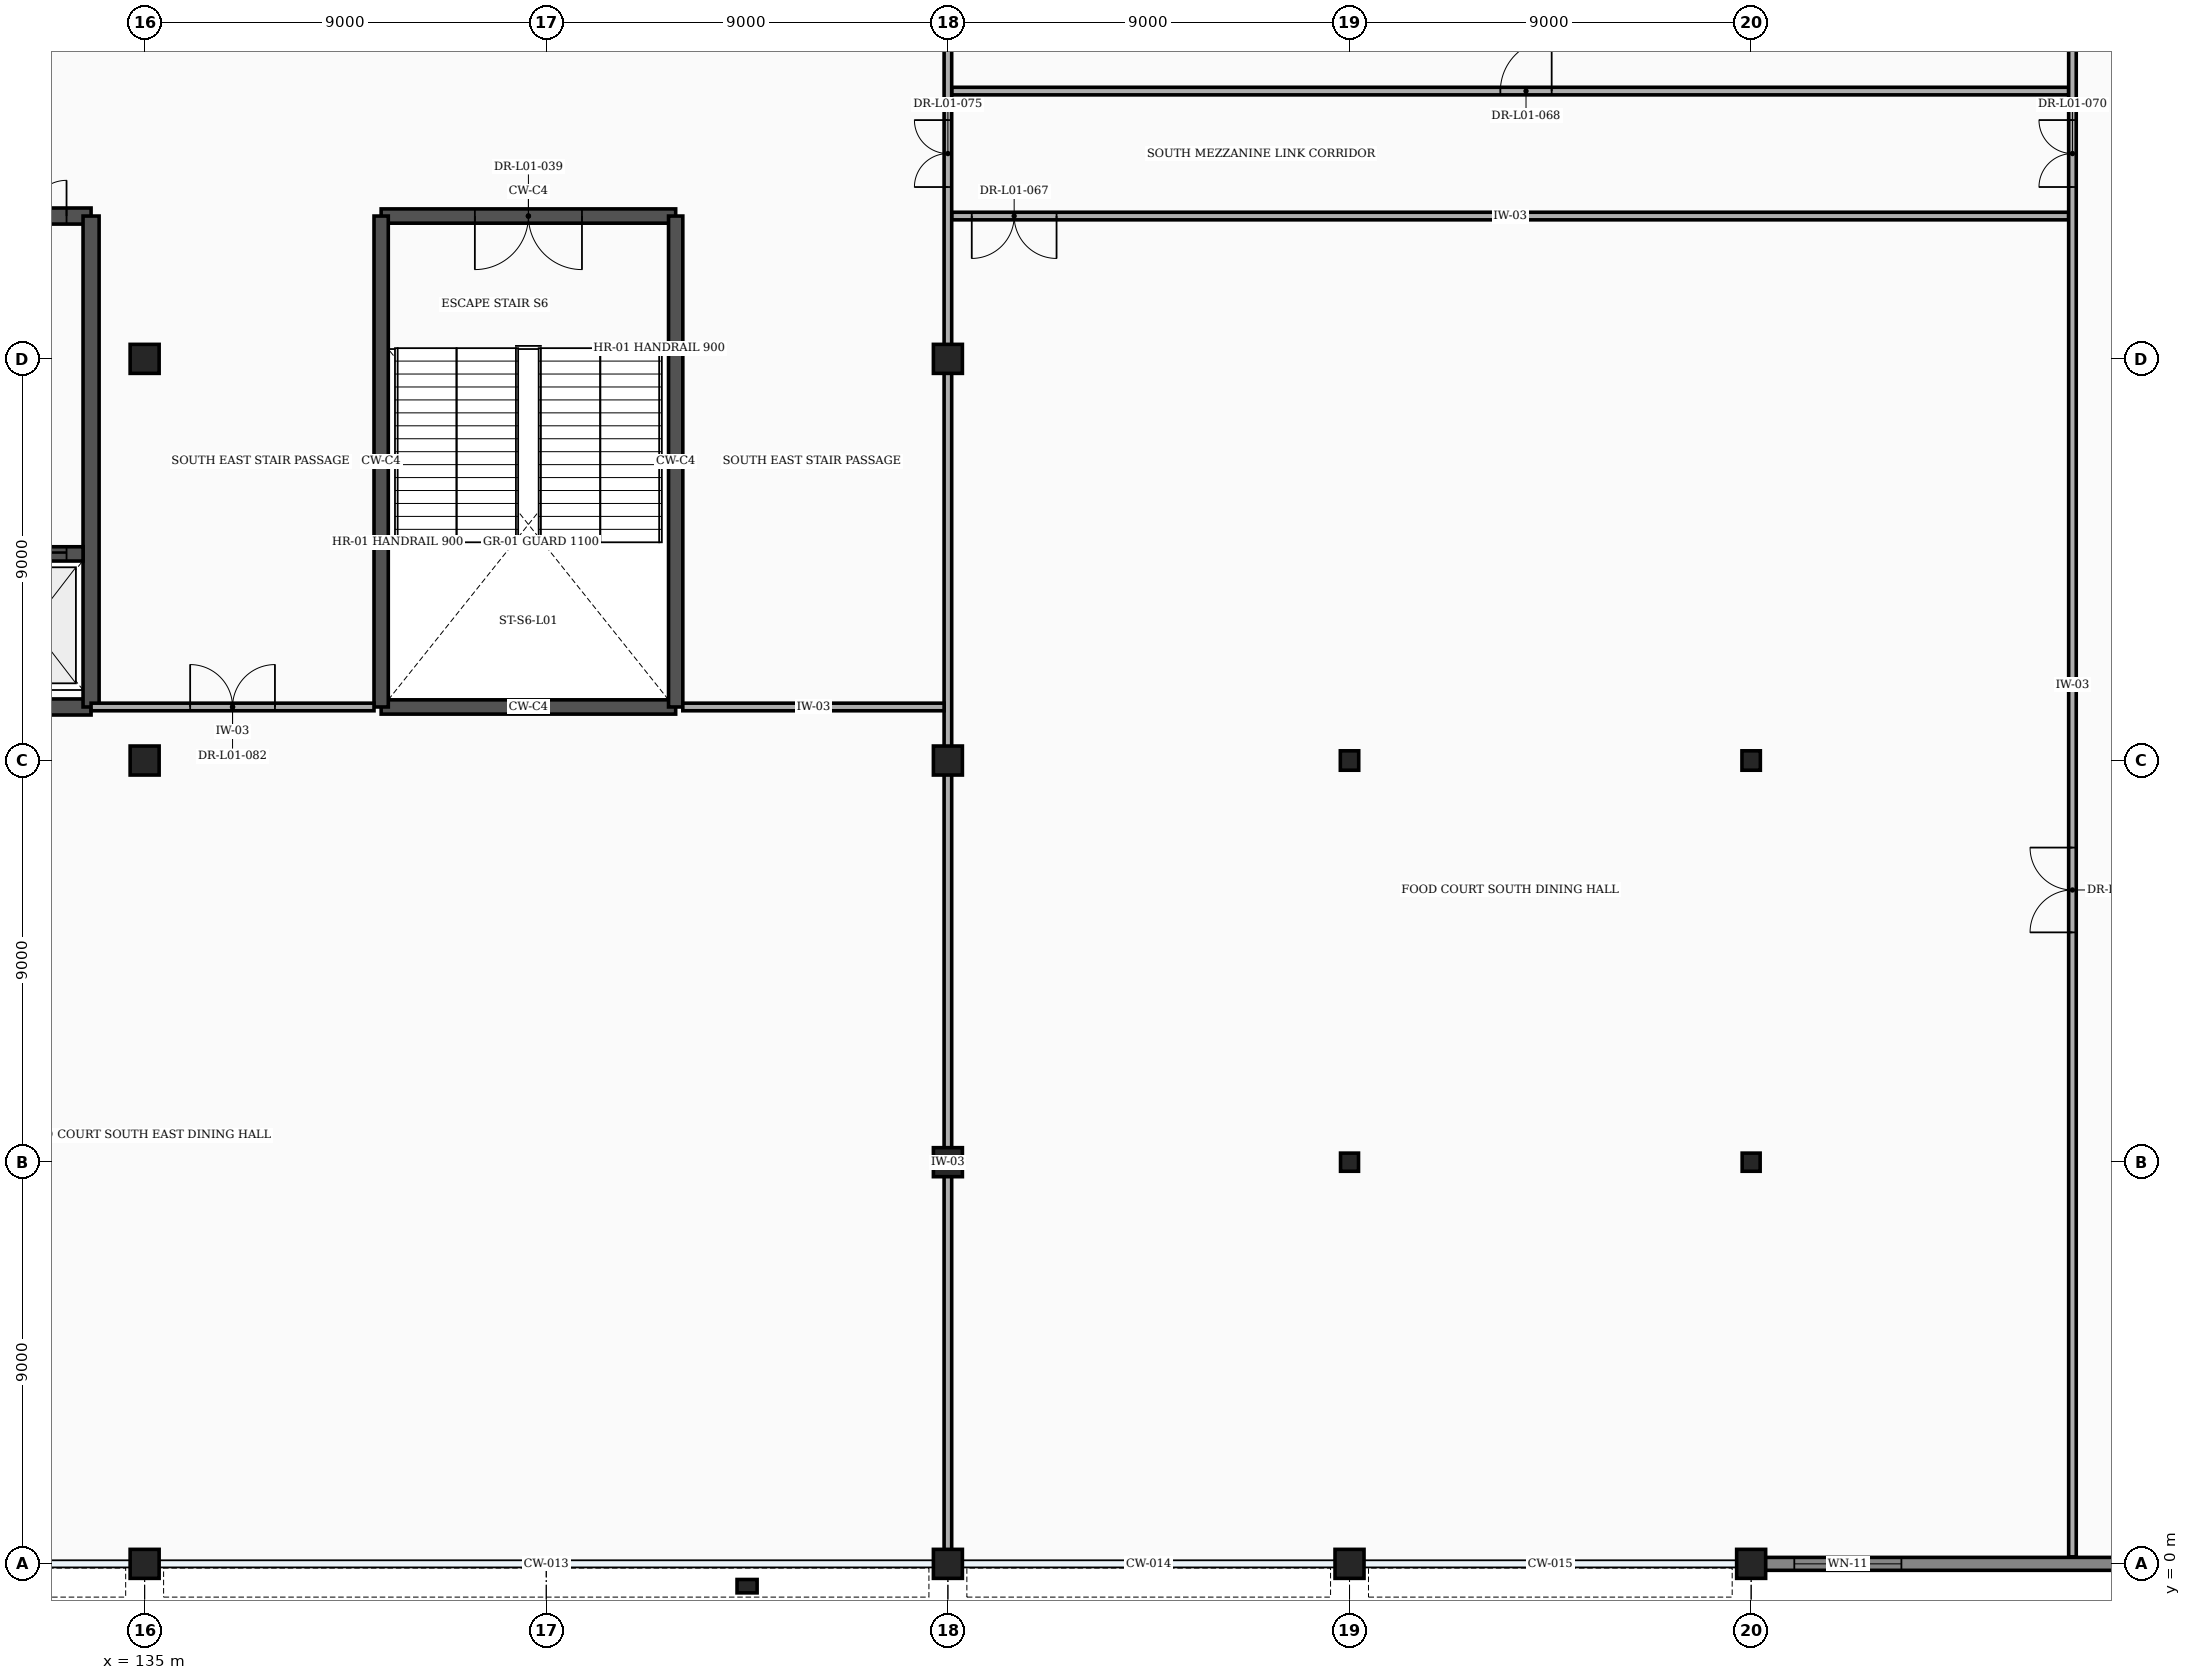
"""IFC4 building model, lengths in metres.
Left out: names, types, materials, properties, quantities, classifications, styles, units other than length and angle.
Written with IfcOpenShell. Run it as: python <this file> out.ifc"""

import sys

from ifc_helpers import new_model, si_unit, direction, frame, frame_2d, origin, origin_2d, place, context, subcontext, project, spatial, rectangle, i_section, extrude, element, fill, save


model = new_model("IFC4")
c1 = context("Model", 3, precision=1e-05, world=origin(), true_north=direction((0.0, 1.0)))
c2 = subcontext(c1, "Body", "Model", "MODEL_VIEW")
j1 = project(units=[si_unit("LENGTHUNIT", "METRE"), si_unit("PLANEANGLEUNIT", "RADIAN")], contexts=[c1])
p1 = place(None, origin())
s1 = spatial("IfcSite", under=j1, at=p1, CompositionType="ELEMENT")
p2 = place(p1, origin())
s2 = spatial("IfcBuilding", under=s1, at=p2, CompositionType="ELEMENT")
p3 = place(p2, frame((0.0, 0.0, 6.0)))
s3 = spatial("IfcBuildingStorey", under=s2, at=p3, CompositionType="ELEMENT", Elevation=6.0)
for number, where, z_axis, x_axis in (
    (1, (135.0, 0.0, 0.0), (0.0, 0.0, 1.0), (1.0, 0.0, 0.0)),
    (2, (135.0, 18.0, 0.0), (0.0, 0.0, 1.0), (1.0, 0.0, 0.0)),
    (3, (135.0, 27.0, 0.0), (0.0, 0.0, 1.0), (1.0, 0.0, 0.0)),
    (4, (153.0, 0.0, 0.0), (0.0, 0.0, 1.0), (1.0, 0.0, 0.0)),
    (5, (153.0, 9.0, 0.0), (0.0, 0.0, 1.0), (1.0, 0.0, 0.0)),
    (6, (153.0, 18.0, 0.0), (0.0, 0.0, 1.0), (1.0, 0.0, 0.0)),
    (7, (153.0, 27.0, 0.0), (0.0, 0.0, 1.0), (1.0, 0.0, 0.0)),
    (8, (162.0, 0.0, 0.0), (0.0, 0.0, 1.0), (1.0, 0.0, 0.0)),
):
    element("IfcColumn", number, at=place(p3, frame(where, z_axis=z_axis, x_axis=x_axis)), inside=s3, PredefinedType="COLUMN", context=c2, shape_type="SweptSolid", body=[
        extrude(rectangle(XDim=0.65, YDim=0.65, at=origin_2d()), origin(), (0.0, 0.0, 1.0), 5.4),
    ])
p4 = place(p3, frame((162.0, 9.0, 0.0), z_axis=(0.0, 0.0, 1.0), x_axis=(1.0, 0.0, 0.0)))
e9 = element("IfcColumn", 9, at=p4, inside=s3, PredefinedType="COLUMN", context=c2, shape_type="SweptSolid", body=[
    extrude(i_section(OverallWidth=0.403, OverallDepth=0.406, WebThickness=0.027, FlangeThickness=0.043, at=origin_2d()), origin(), (0.0, 0.0, 1.0), 5.4),
])
p5 = place(p3, frame((162.0, 18.0, 0.0), z_axis=(0.0, 0.0, 1.0), x_axis=(1.0, 0.0, 0.0)))
e10 = element("IfcColumn", 10, at=p5, inside=s3, PredefinedType="COLUMN", context=c2, shape_type="SweptSolid", body=[
    extrude(i_section(OverallWidth=0.412, OverallDepth=0.435, WebThickness=0.036, FlangeThickness=0.058, at=origin_2d()), origin(), (0.0, 0.0, 1.0), 5.4),
])
p6 = place(p3, frame((171.0, 0.0, 0.0), z_axis=(0.0, 0.0, 1.0), x_axis=(1.0, 0.0, 0.0)))
e11 = element("IfcColumn", 11, at=p6, inside=s3, PredefinedType="COLUMN", context=c2, shape_type="SweptSolid", body=[
    extrude(rectangle(XDim=0.65, YDim=0.65, at=origin_2d()), origin(), (0.0, 0.0, 1.0), 5.4),
])
p7 = place(p3, frame((171.0, 9.0, 0.0), z_axis=(0.0, 0.0, 1.0), x_axis=(1.0, 0.0, 0.0)))
e12 = element("IfcColumn", 12, at=p7, inside=s3, PredefinedType="COLUMN", context=c2, shape_type="SweptSolid", body=[
    extrude(i_section(OverallWidth=0.403, OverallDepth=0.406, WebThickness=0.027, FlangeThickness=0.043, at=origin_2d()), origin(), (0.0, 0.0, 1.0), 5.4),
])
p8 = place(p3, frame((171.0, 18.0, 0.0), z_axis=(0.0, 0.0, 1.0), x_axis=(1.0, 0.0, 0.0)))
e13 = element("IfcColumn", 13, at=p8, inside=s3, PredefinedType="COLUMN", context=c2, shape_type="SweptSolid", body=[
    extrude(i_section(OverallWidth=0.412, OverallDepth=0.435, WebThickness=0.036, FlangeThickness=0.058, at=origin_2d()), origin(), (0.0, 0.0, 1.0), 5.4),
])
p9 = place(p3, frame((148.5, -0.5, 0.0), z_axis=(0.0, 0.0, 1.0), x_axis=(1.0, 0.0, 0.0)))
e14 = element("IfcColumn", 14, at=p9, inside=s3, PredefinedType="PILASTER", context=c2, shape_type="SweptSolid", body=[
    extrude(rectangle(XDim=0.45, YDim=0.3, at=origin_2d()), origin(), (0.0, 0.0, 1.0), 5.4),
])
p10 = place(p3, frame((171.317, 0.0, 0.0), z_axis=(0.0, 0.0, 1.0), x_axis=(1.0, 0.0, 0.0)))
e15 = element("IfcWall", 15, at=p10, inside=s3, PredefinedType="STANDARD", context=c2, shape_type="SweptSolid", body=[
    extrude(rectangle(XDim=17.366, YDim=0.29, at=frame_2d((8.683, 0.0))), origin(), (0.0, 0.0, 1.0), 4.388),
])
p11 = place(p10, frame((0.65, 0.0, 0.85)))
e16 = element("IfcOpeningElement", 16, at=p11, cuts=e15, PredefinedType="OPENING", context=c2, shape_type="SweptSolid", body=[
    extrude(rectangle(XDim=2.4, YDim=2.6, at=frame_2d((1.2, 1.3))), frame((0.0, 0.157, 0.0), z_axis=(0.0, -1.0, 0.0), x_axis=(1.0, 0.0, 0.0)), (0.0, 0.0, 1.0), 0.314),
])
p12 = place(p3, frame((127.2, 19.2, 0.0), z_axis=(0.0, 0.0, 1.0), x_axis=(1.0, 0.0, 0.0)))
e17 = element("IfcWall", 17, at=p12, inside=s3, PredefinedType="SHEAR", context=c2, shape_type="SweptSolid", body=[
    extrude(rectangle(XDim=6.6, YDim=0.36, at=frame_2d((3.3, 0.0))), origin(), (0.0, 0.0, 1.0), 5.15),
])
p13 = place(p3, frame((127.2, 30.2, 0.0), z_axis=(0.0, 0.0, 1.0), x_axis=(1.0, 0.0, 0.0)))
e18 = element("IfcWall", 18, at=p13, inside=s3, PredefinedType="SHEAR", context=c2, shape_type="SweptSolid", body=[
    extrude(rectangle(XDim=6.6, YDim=0.36, at=frame_2d((3.3, 0.0))), origin(), (0.0, 0.0, 1.0), 5.15),
])
p14 = place(p13, frame((4.45, 0.0, 0.0)))
e19 = element("IfcOpeningElement", 19, at=p14, cuts=e18, PredefinedType="OPENING", context=c2, shape_type="SweptSolid", body=[
    extrude(rectangle(XDim=1.6, YDim=2.3, at=frame_2d((0.8, 1.15))), frame((0.0, 0.192, 0.0), z_axis=(0.0, -1.0, 0.0), x_axis=(1.0, 0.0, 0.0)), (0.0, 0.0, 1.0), 0.384),
])
p15 = place(p3, frame((133.8, 19.2, 0.0), z_axis=(0.0, 0.0, 1.0), x_axis=(0.0, 1.0, 0.0)))
e20 = element("IfcWall", 20, at=p15, inside=s3, PredefinedType="SHEAR", context=c2, shape_type="SweptSolid", body=[
    extrude(rectangle(XDim=11.0, YDim=0.36, at=frame_2d((5.5, 0.0))), origin(), (0.0, 0.0, 1.0), 5.15),
])
p16 = place(p3, frame((131.3, 22.63, 0.0), z_axis=(0.0, 0.0, 1.0), x_axis=(1.0, 0.0, 0.0)))
e21 = element("IfcWall", 21, at=p16, inside=s3, PredefinedType="SHEAR", context=c2, shape_type="SweptSolid", body=[
    extrude(rectangle(XDim=2.32, YDim=0.32, at=frame_2d((1.16, 0.0))), origin(), (0.0, 0.0, 1.0), 5.15),
])
p17 = place(p16, frame((0.3, 0.0, 0.0)))
e22 = element("IfcOpeningElement", 22, at=p17, cuts=e21, PredefinedType="OPENING", context=c2, shape_type="SweptSolid", body=[
    extrude(rectangle(XDim=1.65, YDim=2.35, at=frame_2d((0.825, 1.175))), frame((0.0, 0.172, 0.0), z_axis=(0.0, -1.0, 0.0), x_axis=(1.0, 0.0, 0.0)), (0.0, 0.0, 1.0), 0.344),
])
p18 = place(p3, frame((140.3, 19.2, 0.0), z_axis=(0.0, 0.0, 1.0), x_axis=(1.0, 0.0, 0.0)))
e23 = element("IfcWall", 23, at=p18, inside=s3, PredefinedType="SHEAR", context=c2, shape_type="SweptSolid", body=[
    extrude(rectangle(XDim=6.6, YDim=0.32, at=frame_2d((3.3, 0.0))), origin(), (0.0, 0.0, 1.0), 5.15),
])
p19 = place(p3, frame((140.3, 30.2, 0.0), z_axis=(0.0, 0.0, 1.0), x_axis=(1.0, 0.0, 0.0)))
e24 = element("IfcWall", 24, at=p19, inside=s3, PredefinedType="SHEAR", context=c2, shape_type="SweptSolid", body=[
    extrude(rectangle(XDim=6.6, YDim=0.32, at=frame_2d((3.3, 0.0))), origin(), (0.0, 0.0, 1.0), 5.15),
])
p20 = place(p19, frame((2.1, 0.0, 0.0)))
e25 = element("IfcOpeningElement", 25, at=p20, cuts=e24, PredefinedType="OPENING", context=c2, shape_type="SweptSolid", body=[
    extrude(rectangle(XDim=2.4, YDim=2.25, at=frame_2d((1.2, 1.125))), frame((0.0, 0.172, 0.0), z_axis=(0.0, -1.0, 0.0), x_axis=(1.0, 0.0, 0.0)), (0.0, 0.0, 1.0), 0.344),
])
for number, where, z_axis, x_axis in (
    (26, (140.3, 19.2, 0.0), (0.0, 0.0, 1.0), (0.0, 1.0, 0.0)),
    (27, (146.9, 19.2, 0.0), (0.0, 0.0, 1.0), (0.0, 1.0, 0.0)),
):
    element("IfcWall", number, at=place(p3, frame(where, z_axis=z_axis, x_axis=x_axis)), inside=s3, PredefinedType="SHEAR", context=c2, shape_type="SweptSolid", body=[
        extrude(rectangle(XDim=11.0, YDim=0.32, at=frame_2d((5.5, 0.0))), origin(), (0.0, 0.0, 1.0), 5.15),
    ])
p21 = place(p3, frame((153.085, 30.2, 0.0), z_axis=(0.0, 0.0, 1.0), x_axis=(1.0, 0.0, 0.0)))
e28 = element("IfcWall", 28, at=p21, inside=s3, PredefinedType="PARTITIONING", context=c2, shape_type="SweptSolid", body=[
    extrude(rectangle(XDim=25.03, YDim=0.17, at=frame_2d((12.515, 0.0))), origin(), (0.0, 0.0, 1.0), 5.15),
])
p22 = place(p21, frame((0.45, 0.0, 0.0)))
e29 = element("IfcOpeningElement", 29, at=p22, cuts=e28, PredefinedType="OPENING", context=c2, shape_type="SweptSolid", body=[
    extrude(rectangle(XDim=1.9, YDim=2.35, at=frame_2d((0.95, 1.175))), frame((0.0, 0.097, 0.0), z_axis=(0.0, -1.0, 0.0), x_axis=(1.0, 0.0, 0.0)), (0.0, 0.0, 1.0), 0.194),
])
p23 = place(p3, frame((153.085, 33.0, 0.0), z_axis=(0.0, 0.0, 1.0), x_axis=(1.0, 0.0, 0.0)))
e30 = element("IfcWall", 30, at=p23, inside=s3, PredefinedType="PARTITIONING", context=c2, shape_type="SweptSolid", body=[
    extrude(rectangle(XDim=25.03, YDim=0.17, at=frame_2d((12.515, 0.0))), origin(), (0.0, 0.0, 1.0), 5.15),
])
p24 = place(p23, frame((12.295, 0.0, 0.0)))
e31 = element("IfcOpeningElement", 31, at=p24, cuts=e30, PredefinedType="OPENING", context=c2, shape_type="SweptSolid", body=[
    extrude(rectangle(XDim=1.15, YDim=2.15, at=frame_2d((0.575, 1.075))), frame((0.0, 0.097, 0.0), z_axis=(0.0, -1.0, 0.0), x_axis=(1.0, 0.0, 0.0)), (0.0, 0.0, 1.0), 0.194),
])
p25 = place(p3, frame((178.2, 0.157, 0.0), z_axis=(0.0, 0.0, 1.0), x_axis=(0.0, 1.0, 0.0)))
e32 = element("IfcWall", 32, at=p25, inside=s3, PredefinedType="PARTITIONING", context=c2, shape_type="SweptSolid", body=[
    extrude(rectangle(XDim=39.083, YDim=0.17, at=frame_2d((19.541, 0.0))), origin(), (0.0, 0.0, 1.0), 5.15),
])
p26 = place(p25, frame((13.992, 0.0, 0.0)))
e33 = element("IfcOpeningElement", 33, at=p26, cuts=e32, PredefinedType="OPENING", context=c2, shape_type="SweptSolid", body=[
    extrude(rectangle(XDim=1.9, YDim=2.35, at=frame_2d((0.95, 1.175))), frame((0.0, 0.097, 0.0), z_axis=(0.0, -1.0, 0.0), x_axis=(1.0, 0.0, 0.0)), (0.0, 0.0, 1.0), 0.194),
])
p27 = place(p25, frame((30.693, 0.0, 0.0)))
e34 = element("IfcOpeningElement", 34, at=p27, cuts=e32, PredefinedType="OPENING", context=c2, shape_type="SweptSolid", body=[
    extrude(rectangle(XDim=1.5, YDim=2.2, at=frame_2d((0.75, 1.1))), frame((0.0, 0.097, 0.0), z_axis=(0.0, -1.0, 0.0), x_axis=(1.0, 0.0, 0.0)), (0.0, 0.0, 1.0), 0.194),
])
p28 = place(p3, frame((153.0, 0.22, 0.0), z_axis=(0.0, 0.0, 1.0), x_axis=(0.0, 1.0, 0.0)))
e35 = element("IfcWall", 35, at=p28, inside=s3, PredefinedType="PARTITIONING", context=c2, shape_type="SweptSolid", body=[
    extrude(rectangle(XDim=17.56, YDim=0.17, at=frame_2d((8.78, 0.0))), origin(), (0.0, 0.0, 1.0), 4.617),
])
p29 = place(p3, frame((153.0, 18.22, 0.0), z_axis=(0.0, 0.0, 1.0), x_axis=(0.0, 1.0, 0.0)))
e36 = element("IfcWall", 36, at=p29, inside=s3, PredefinedType="PARTITIONING", context=c2, shape_type="SweptSolid", body=[
    extrude(rectangle(XDim=8.56, YDim=0.17, at=frame_2d((4.28, 0.0))), origin(), (0.0, 0.0, 1.0), 4.617),
])
p30 = place(p3, frame((153.0, 27.22, 0.0), z_axis=(0.0, 0.0, 1.0), x_axis=(0.0, 1.0, 0.0)))
e37 = element("IfcWall", 37, at=p30, inside=s3, PredefinedType="PARTITIONING", context=c2, shape_type="SweptSolid", body=[
    extrude(rectangle(XDim=8.56, YDim=0.17, at=frame_2d((4.28, 0.0))), origin(), (0.0, 0.0, 1.0), 4.617),
])
p31 = place(p30, frame((3.63, 0.0, 0.0)))
e38 = element("IfcOpeningElement", 38, at=p31, cuts=e37, PredefinedType="OPENING", context=c2, shape_type="SweptSolid", body=[
    extrude(rectangle(XDim=1.5, YDim=2.2, at=frame_2d((0.75, 1.1))), frame((0.0, 0.097, 0.0), z_axis=(0.0, -1.0, 0.0), x_axis=(1.0, 0.0, 0.0)), (0.0, 0.0, 1.0), 0.194),
])
p32 = place(p3, frame((133.8, 19.2, 0.0), z_axis=(0.0, 0.0, 1.0), x_axis=(1.0, 0.0, 0.0)))
e39 = element("IfcWall", 39, at=p32, inside=s3, PredefinedType="PARTITIONING", context=c2, shape_type="SweptSolid", body=[
    extrude(rectangle(XDim=6.34, YDim=0.17, at=frame_2d((3.17, 0.0))), origin(), (0.0, 0.0, 1.0), 5.15),
])
p33 = place(p32, frame((2.22, 0.0, 0.0)))
e40 = element("IfcOpeningElement", 40, at=p33, cuts=e39, PredefinedType="OPENING", context=c2, shape_type="SweptSolid", body=[
    extrude(rectangle(XDim=1.9, YDim=2.35, at=frame_2d((0.95, 1.175))), frame((0.0, 0.097, 0.0), z_axis=(0.0, -1.0, 0.0), x_axis=(1.0, 0.0, 0.0)), (0.0, 0.0, 1.0), 0.194),
])
p34 = place(p3, frame((147.06, 19.2, 0.0), z_axis=(0.0, 0.0, 1.0), x_axis=(1.0, 0.0, 0.0)))
e41 = element("IfcWall", 41, at=p34, inside=s3, PredefinedType="PARTITIONING", context=c2, shape_type="SweptSolid", body=[
    extrude(rectangle(XDim=5.855, YDim=0.17, at=frame_2d((2.927, 0.0))), origin(), (0.0, 0.0, 1.0), 5.15),
])
p35 = place(p11, origin())
e42 = element("IfcWindow", 42, at=p35, inside=s3, PartitioningType="SINGLE_PANEL", PredefinedType="WINDOW", context=c2, shape_type="SweptSolid", body=[
    extrude(rectangle(XDim=2.4, YDim=2.6, at=frame_2d((1.2, 1.3))), frame((0.0, 0.03, 0.0), z_axis=(0.0, -1.0, 0.0), x_axis=(1.0, 0.0, 0.0)), (0.0, 0.0, 1.0), 0.06),
])
fill(e16, e42)
p36 = place(p17, origin())
e43 = element("IfcDoor", 43, at=p36, inside=s3, OperationType="DOUBLE_DOOR_SLIDING", PredefinedType="DOOR", context=c2, shape_type="SweptSolid", body=[
    extrude(rectangle(XDim=1.65, YDim=2.35, at=frame_2d((0.825, 1.175))), frame((0.0, 0.025, 0.0), z_axis=(0.0, -1.0, 0.0), x_axis=(1.0, 0.0, 0.0)), (0.0, 0.0, 1.0), 0.05),
])
fill(e22, e43)
p37 = place(p14, origin())
e44 = element("IfcDoor", 44, at=p37, inside=s3, OperationType="DOUBLE_DOOR_SINGLE_SWING", PredefinedType="DOOR", context=c2, shape_type="SweptSolid", body=[
    extrude(rectangle(XDim=1.6, YDim=2.3, at=frame_2d((0.8, 1.15))), frame((0.0, 0.025, 0.0), z_axis=(0.0, -1.0, 0.0), x_axis=(1.0, 0.0, 0.0)), (0.0, 0.0, 1.0), 0.05),
])
fill(e19, e44)
p38 = place(p20, frame((2.4, 0.0, 0.0), z_axis=(0.0, 0.0, 1.0), x_axis=(-1.0, 0.0, 0.0)))
e45 = element("IfcDoor", 45, at=p38, inside=s3, OperationType="DOUBLE_DOOR_SINGLE_SWING", PredefinedType="DOOR", context=c2, shape_type="SweptSolid", body=[
    extrude(rectangle(XDim=2.4, YDim=2.25, at=frame_2d((1.2, 1.125))), frame((0.0, 0.025, 0.0), z_axis=(0.0, -1.0, 0.0), x_axis=(1.0, 0.0, 0.0)), (0.0, 0.0, 1.0), 0.05),
])
fill(e25, e45)
p39 = place(p22, frame((1.9, 0.0, 0.0), z_axis=(0.0, 0.0, 1.0), x_axis=(-1.0, 0.0, 0.0)))
e46 = element("IfcDoor", 46, at=p39, inside=s3, OperationType="DOUBLE_DOOR_SINGLE_SWING", PredefinedType="DOOR", context=c2, shape_type="SweptSolid", body=[
    extrude(rectangle(XDim=1.9, YDim=2.35, at=frame_2d((0.95, 1.175))), frame((0.0, 0.025, 0.0), z_axis=(0.0, -1.0, 0.0), x_axis=(1.0, 0.0, 0.0)), (0.0, 0.0, 1.0), 0.05),
])
fill(e29, e46)
p40 = place(p24, origin())
e47 = element("IfcDoor", 47, at=p40, inside=s3, OperationType="SINGLE_SWING_RIGHT", PredefinedType="DOOR", context=c2, shape_type="SweptSolid", body=[
    extrude(rectangle(XDim=1.15, YDim=2.15, at=frame_2d((0.575, 1.075))), frame((0.0, 0.025, 0.0), z_axis=(0.0, -1.0, 0.0), x_axis=(1.0, 0.0, 0.0)), (0.0, 0.0, 1.0), 0.05),
])
fill(e31, e47)
p41 = place(p26, origin())
e48 = element("IfcDoor", 48, at=p41, inside=s3, OperationType="DOUBLE_DOOR_SINGLE_SWING", PredefinedType="DOOR", context=c2, shape_type="SweptSolid", body=[
    extrude(rectangle(XDim=1.9, YDim=2.35, at=frame_2d((0.95, 1.175))), frame((0.0, 0.025, 0.0), z_axis=(0.0, -1.0, 0.0), x_axis=(1.0, 0.0, 0.0)), (0.0, 0.0, 1.0), 0.05),
])
fill(e33, e48)
p42 = place(p27, origin())
e49 = element("IfcDoor", 49, at=p42, inside=s3, OperationType="DOUBLE_DOOR_SINGLE_SWING", PredefinedType="DOOR", context=c2, shape_type="SweptSolid", body=[
    extrude(rectangle(XDim=1.5, YDim=2.2, at=frame_2d((0.75, 1.1))), frame((0.0, 0.025, 0.0), z_axis=(0.0, -1.0, 0.0), x_axis=(1.0, 0.0, 0.0)), (0.0, 0.0, 1.0), 0.05),
])
fill(e34, e49)
p43 = place(p31, origin())
e50 = element("IfcDoor", 50, at=p43, inside=s3, OperationType="DOUBLE_DOOR_SINGLE_SWING", PredefinedType="DOOR", context=c2, shape_type="SweptSolid", body=[
    extrude(rectangle(XDim=1.5, YDim=2.2, at=frame_2d((0.75, 1.1))), frame((0.0, 0.025, 0.0), z_axis=(0.0, -1.0, 0.0), x_axis=(1.0, 0.0, 0.0)), (0.0, 0.0, 1.0), 0.05),
])
fill(e38, e50)
p44 = place(p33, origin())
e51 = element("IfcDoor", 51, at=p44, inside=s3, OperationType="DOUBLE_DOOR_SINGLE_SWING", PredefinedType="DOOR", context=c2, shape_type="SweptSolid", body=[
    extrude(rectangle(XDim=1.9, YDim=2.35, at=frame_2d((0.95, 1.175))), frame((0.0, 0.025, 0.0), z_axis=(0.0, -1.0, 0.0), x_axis=(1.0, 0.0, 0.0)), (0.0, 0.0, 1.0), 0.05),
])
fill(e40, e51)
save(model, sys.argv[1])
